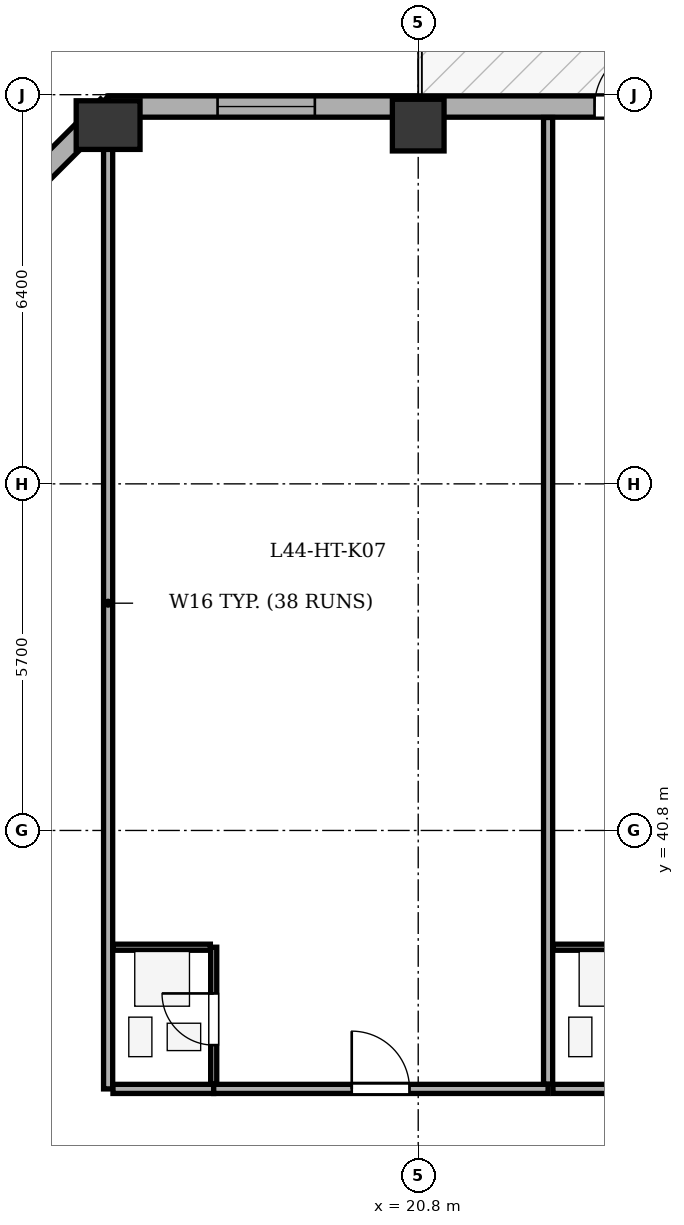
"""IFC4 building model, lengths in metres.
Left out: names, types, materials, properties, quantities, classifications, styles, units other than length and angle.
Written with IfcOpenShell. Run it as: python <this file> out.ifc"""

import sys

from ifc_helpers import new_model, si_unit, direction, frame, frame_2d, origin, origin_2d, place, context, subcontext, project, spatial, rectangle, extrude, element, fill, save


model = new_model("IFC4")
c1 = context("Model", 3, precision=1e-05, world=origin(), true_north=direction((0.0, 1.0)))
c2 = subcontext(c1, "Body", "Model", "MODEL_VIEW")
j1 = project(units=[si_unit("LENGTHUNIT", "METRE"), si_unit("PLANEANGLEUNIT", "RADIAN")], contexts=[c1])
p1 = place(None, origin())
s1 = spatial("IfcSite", under=j1, at=p1, CompositionType="ELEMENT")
p2 = place(p1, origin())
s2 = spatial("IfcBuilding", under=s1, at=p2, CompositionType="ELEMENT")
p3 = place(p2, frame((0.0, 0.0, 172.8)))
s3 = spatial("IfcBuildingStorey", under=s2, at=p3, CompositionType="ELEMENT", Elevation=172.8)
p4 = place(p3, frame((15.7, 52.4, 0.0), z_axis=(0.0, 0.0, 1.0), x_axis=(1.0, 0.0, 0.0)))
e1 = element("IfcColumn", 1, at=p4, inside=s3, PredefinedType="COLUMN", context=c2, shape_type="SweptSolid", body=[
    extrude(rectangle(XDim=0.8, YDim=1.05, at=origin_2d()), origin(), (0.0, 0.0, 1.0), 3.5),
])
p5 = place(p3, frame((20.8, 52.4, 0.0), z_axis=(0.0, 0.0, 1.0), x_axis=(1.0, 0.0, 0.0)))
e2 = element("IfcColumn", 2, at=p5, inside=s3, PredefinedType="COLUMN", context=c2, shape_type="SweptSolid", body=[
    extrude(rectangle(XDim=0.85, YDim=0.85, at=origin_2d()), origin(), (0.0, 0.0, 1.0), 3.5),
])
p6 = place(p3, frame((10.895, 47.9, 0.0), z_axis=(0.0, 0.0, 1.0), x_axis=(0.707088817216, 0.7071247447, 0.0)))
e3 = element("IfcWall", 3, at=p6, inside=s3, PredefinedType="STANDARD", context=c2, shape_type="SweptSolid", body=[
    extrude(rectangle(XDim=6.795, YDim=0.35, at=frame_2d((3.398, 0.0))), origin(), (0.0, 0.0, 1.0), 2.785),
])
p7 = place(p6, frame((2.698, 0.0, 0.75)))
e4 = element("IfcOpeningElement", 4, at=p7, cuts=e3, PredefinedType="OPENING", context=c2, shape_type="SweptSolid", body=[
    extrude(rectangle(XDim=1.4, YDim=1.65, at=frame_2d((0.7, 0.825))), frame((0.0, 0.185, 0.0), z_axis=(0.0, -1.0, 0.0), x_axis=(1.0, 0.0, 0.0)), (0.0, 0.0, 1.0), 0.37),
])
p8 = place(p3, frame((15.7, 52.705, 0.0), z_axis=(0.0, 0.0, 1.0), x_axis=(1.0, 0.0, 0.0)))
e5 = element("IfcWall", 5, at=p8, inside=s3, PredefinedType="STANDARD", context=c2, shape_type="SweptSolid", body=[
    extrude(rectangle(XDim=35.0, YDim=0.35, at=frame_2d((17.5, 0.0))), origin(), (0.0, 0.0, 1.0), 2.785),
])
p9 = place(p8, frame((8.0, 0.0, 0.0)))
e6 = element("IfcOpeningElement", 6, at=p9, cuts=e5, PredefinedType="OPENING", context=c2, shape_type="SweptSolid", body=[
    extrude(rectangle(XDim=1.0, YDim=2.02, at=frame_2d((0.5, 1.01))), frame((0.0, 0.185, 0.0), z_axis=(0.0, -1.0, 0.0), x_axis=(1.0, 0.0, 0.0)), (0.0, 0.0, 1.0), 0.37),
])
p10 = place(p8, frame((1.8, 0.0, 0.75)))
e7 = element("IfcOpeningElement", 7, at=p10, cuts=e5, PredefinedType="OPENING", context=c2, shape_type="SweptSolid", body=[
    extrude(rectangle(XDim=1.6, YDim=1.75, at=frame_2d((0.8, 0.875))), frame((0.0, 0.185, 0.0), z_axis=(0.0, -1.0, 0.0), x_axis=(1.0, 0.0, 0.0)), (0.0, 0.0, 1.0), 0.37),
])
p11 = place(p8, frame((16.4, 0.0, 0.75)))
e8 = element("IfcOpeningElement", 8, at=p11, cuts=e5, PredefinedType="OPENING", context=c2, shape_type="SweptSolid", body=[
    extrude(rectangle(XDim=1.6, YDim=1.75, at=frame_2d((0.8, 0.875))), frame((0.0, 0.185, 0.0), z_axis=(0.0, -1.0, 0.0), x_axis=(1.0, 0.0, 0.0)), (0.0, 0.0, 1.0), 0.37),
])
p12 = place(p8, frame((20.619, 0.0, 0.75)))
e9 = element("IfcOpeningElement", 9, at=p12, cuts=e5, PredefinedType="OPENING", context=c2, shape_type="SweptSolid", body=[
    extrude(rectangle(XDim=1.35, YDim=1.75, at=frame_2d((0.675, 0.875))), frame((0.0, 0.185, 0.0), z_axis=(0.0, -1.0, 0.0), x_axis=(1.0, 0.0, 0.0)), (0.0, 0.0, 1.0), 0.37),
])
p13 = place(p8, frame((24.235, 0.0, 0.75)))
e10 = element("IfcOpeningElement", 10, at=p13, cuts=e5, PredefinedType="OPENING", context=c2, shape_type="SweptSolid", body=[
    extrude(rectangle(XDim=1.6, YDim=1.75, at=frame_2d((0.8, 0.875))), frame((0.0, 0.185, 0.0), z_axis=(0.0, -1.0, 0.0), x_axis=(1.0, 0.0, 0.0)), (0.0, 0.0, 1.0), 0.37),
])
p14 = place(p8, frame((27.229, 0.0, 0.75)))
e11 = element("IfcOpeningElement", 11, at=p14, cuts=e5, PredefinedType="OPENING", context=c2, shape_type="SweptSolid", body=[
    extrude(rectangle(XDim=1.6, YDim=1.75, at=frame_2d((0.8, 0.875))), frame((0.0, 0.185, 0.0), z_axis=(0.0, -1.0, 0.0), x_axis=(1.0, 0.0, 0.0)), (0.0, 0.0, 1.0), 0.37),
])
p15 = place(p8, frame((31.637, 0.0, 0.75)))
e12 = element("IfcOpeningElement", 12, at=p15, cuts=e5, PredefinedType="OPENING", context=c2, shape_type="SweptSolid", body=[
    extrude(rectangle(XDim=1.6, YDim=1.75, at=frame_2d((0.8, 0.875))), frame((0.0, 0.185, 0.0), z_axis=(0.0, -1.0, 0.0), x_axis=(1.0, 0.0, 0.0)), (0.0, 0.0, 1.0), 0.37),
])
p16 = place(p3, frame((15.7, 36.55, 0.0), z_axis=(0.0, 0.0, 1.0), x_axis=(0.0, 1.0, 0.0)))
e13 = element("IfcWall", 13, at=p16, inside=s3, PredefinedType="PARTITIONING", context=c2, shape_type="SweptSolid", body=[
    extrude(rectangle(XDim=15.975, YDim=0.15, at=frame_2d((7.987, 0.0))), origin(), (0.0, 0.0, 1.0), 3.2),
])
p17 = place(p3, frame((15.78, 36.55, 0.0), z_axis=(0.0, 0.0, 1.0), x_axis=(1.0, 0.0, 0.0)))
e14 = element("IfcWall", 14, at=p17, inside=s3, PredefinedType="PARTITIONING", context=c2, shape_type="SweptSolid", body=[
    extrude(rectangle(XDim=1.656, YDim=0.15, at=frame_2d((0.828, 0.0))), origin(), (0.0, 0.0, 1.0), 3.2),
])
p18 = place(p3, frame((17.437, 36.55, 0.0), z_axis=(0.0, 0.0, 1.0), x_axis=(1.0, 0.0, 0.0)))
e15 = element("IfcWall", 15, at=p18, inside=s3, PredefinedType="PARTITIONING", context=c2, shape_type="SweptSolid", body=[
    extrude(rectangle(XDim=5.5, YDim=0.15, at=frame_2d((2.75, 0.0))), origin(), (0.0, 0.0, 1.0), 3.2),
])
p19 = place(p18, frame((2.27, 0.0, 0.0)))
e16 = element("IfcOpeningElement", 16, at=p19, cuts=e15, PredefinedType="OPENING", context=c2, shape_type="SweptSolid", body=[
    extrude(rectangle(XDim=0.95, YDim=2.1, at=frame_2d((0.475, 1.05))), frame((0.0, 0.085, 0.0), z_axis=(0.0, -1.0, 0.0), x_axis=(1.0, 0.0, 0.0)), (0.0, 0.0, 1.0), 0.17),
])
p20 = place(p3, frame((17.437, 36.63, 0.0), z_axis=(0.0, 0.0, 1.0), x_axis=(0.0, 1.0, 0.0)))
e17 = element("IfcWall", 17, at=p20, inside=s3, PredefinedType="PARTITIONING", context=c2, shape_type="SweptSolid", body=[
    extrude(rectangle(XDim=2.25, YDim=0.1, at=frame_2d((1.125, 0.0))), origin(), (0.0, 0.0, 1.0), 3.2),
])
p21 = place(p20, frame((0.64, 0.0, 0.0)))
e18 = element("IfcOpeningElement", 18, at=p21, cuts=e17, PredefinedType="OPENING", context=c2, shape_type="SweptSolid", body=[
    extrude(rectangle(XDim=0.85, YDim=2.05, at=frame_2d((0.425, 1.025))), frame((0.0, 0.06, 0.0), z_axis=(0.0, -1.0, 0.0), x_axis=(1.0, 0.0, 0.0)), (0.0, 0.0, 1.0), 0.12),
])
p22 = place(p3, frame((15.78, 38.88, 0.0), z_axis=(0.0, 0.0, 1.0), x_axis=(1.0, 0.0, 0.0)))
e19 = element("IfcWall", 19, at=p22, inside=s3, PredefinedType="PARTITIONING", context=c2, shape_type="SweptSolid", body=[
    extrude(rectangle(XDim=1.602, YDim=0.1, at=frame_2d((0.801, 0.0))), origin(), (0.0, 0.0, 1.0), 3.2),
])
p23 = place(p3, frame((22.936, 36.63, 0.0), z_axis=(0.0, 0.0, 1.0), x_axis=(0.0, 1.0, 0.0)))
e20 = element("IfcWall", 20, at=p23, inside=s3, PredefinedType="PARTITIONING", context=c2, shape_type="SweptSolid", body=[
    extrude(rectangle(XDim=15.895, YDim=0.15, at=frame_2d((7.948, 0.0))), origin(), (0.0, 0.0, 1.0), 3.2),
])
p24 = place(p3, frame((23.016, 36.55, 0.0), z_axis=(0.0, 0.0, 1.0), x_axis=(1.0, 0.0, 0.0)))
e21 = element("IfcWall", 21, at=p24, inside=s3, PredefinedType="PARTITIONING", context=c2, shape_type="SweptSolid", body=[
    extrude(rectangle(XDim=1.801, YDim=0.15, at=frame_2d((0.901, 0.0))), origin(), (0.0, 0.0, 1.0), 3.2),
])
p25 = place(p3, frame((23.016, 38.88, 0.0), z_axis=(0.0, 0.0, 1.0), x_axis=(1.0, 0.0, 0.0)))
e22 = element("IfcWall", 22, at=p25, inside=s3, PredefinedType="PARTITIONING", context=c2, shape_type="SweptSolid", body=[
    extrude(rectangle(XDim=1.746, YDim=0.1, at=frame_2d((0.873, 0.0))), origin(), (0.0, 0.0, 1.0), 3.2),
])
p26 = place(p9, origin())
e23 = element("IfcDoor", 23, at=p26, inside=s3, OperationType="SINGLE_SWING_RIGHT", PredefinedType="DOOR", context=c2, shape_type="SweptSolid", body=[
    extrude(rectangle(XDim=1.0, YDim=2.02, at=frame_2d((0.5, 1.01))), frame((0.0, 0.025, 0.0), z_axis=(0.0, -1.0, 0.0), x_axis=(1.0, 0.0, 0.0)), (0.0, 0.0, 1.0), 0.05),
])
fill(e6, e23)
p27 = place(p10, origin())
e24 = element("IfcWindow", 24, at=p27, inside=s3, PartitioningType="SINGLE_PANEL", PredefinedType="WINDOW", context=c2, shape_type="SweptSolid", body=[
    extrude(rectangle(XDim=1.6, YDim=1.75, at=frame_2d((0.8, 0.875))), frame((0.0, -0.01, 0.0), z_axis=(0.0, -1.0, 0.0), x_axis=(1.0, 0.0, 0.0)), (0.0, 0.0, 1.0), 0.06),
])
fill(e7, e24)
p28 = place(p21, origin())
e25 = element("IfcDoor", 25, at=p28, inside=s3, OperationType="SINGLE_SWING_RIGHT", PredefinedType="DOOR", context=c2, shape_type="SweptSolid", body=[
    extrude(rectangle(XDim=0.85, YDim=2.05, at=frame_2d((0.425, 1.025))), frame((0.0, 0.025, 0.0), z_axis=(0.0, -1.0, 0.0), x_axis=(1.0, 0.0, 0.0)), (0.0, 0.0, 1.0), 0.05),
])
fill(e18, e25)
p29 = place(p19, origin())
e26 = element("IfcDoor", 26, at=p29, inside=s3, OperationType="SINGLE_SWING_LEFT", PredefinedType="DOOR", context=c2, shape_type="SweptSolid", body=[
    extrude(rectangle(XDim=0.95, YDim=2.1, at=frame_2d((0.475, 1.05))), frame((0.0, 0.025, 0.0), z_axis=(0.0, -1.0, 0.0), x_axis=(1.0, 0.0, 0.0)), (0.0, 0.0, 1.0), 0.05),
])
fill(e16, e26)
save(model, sys.argv[1])
